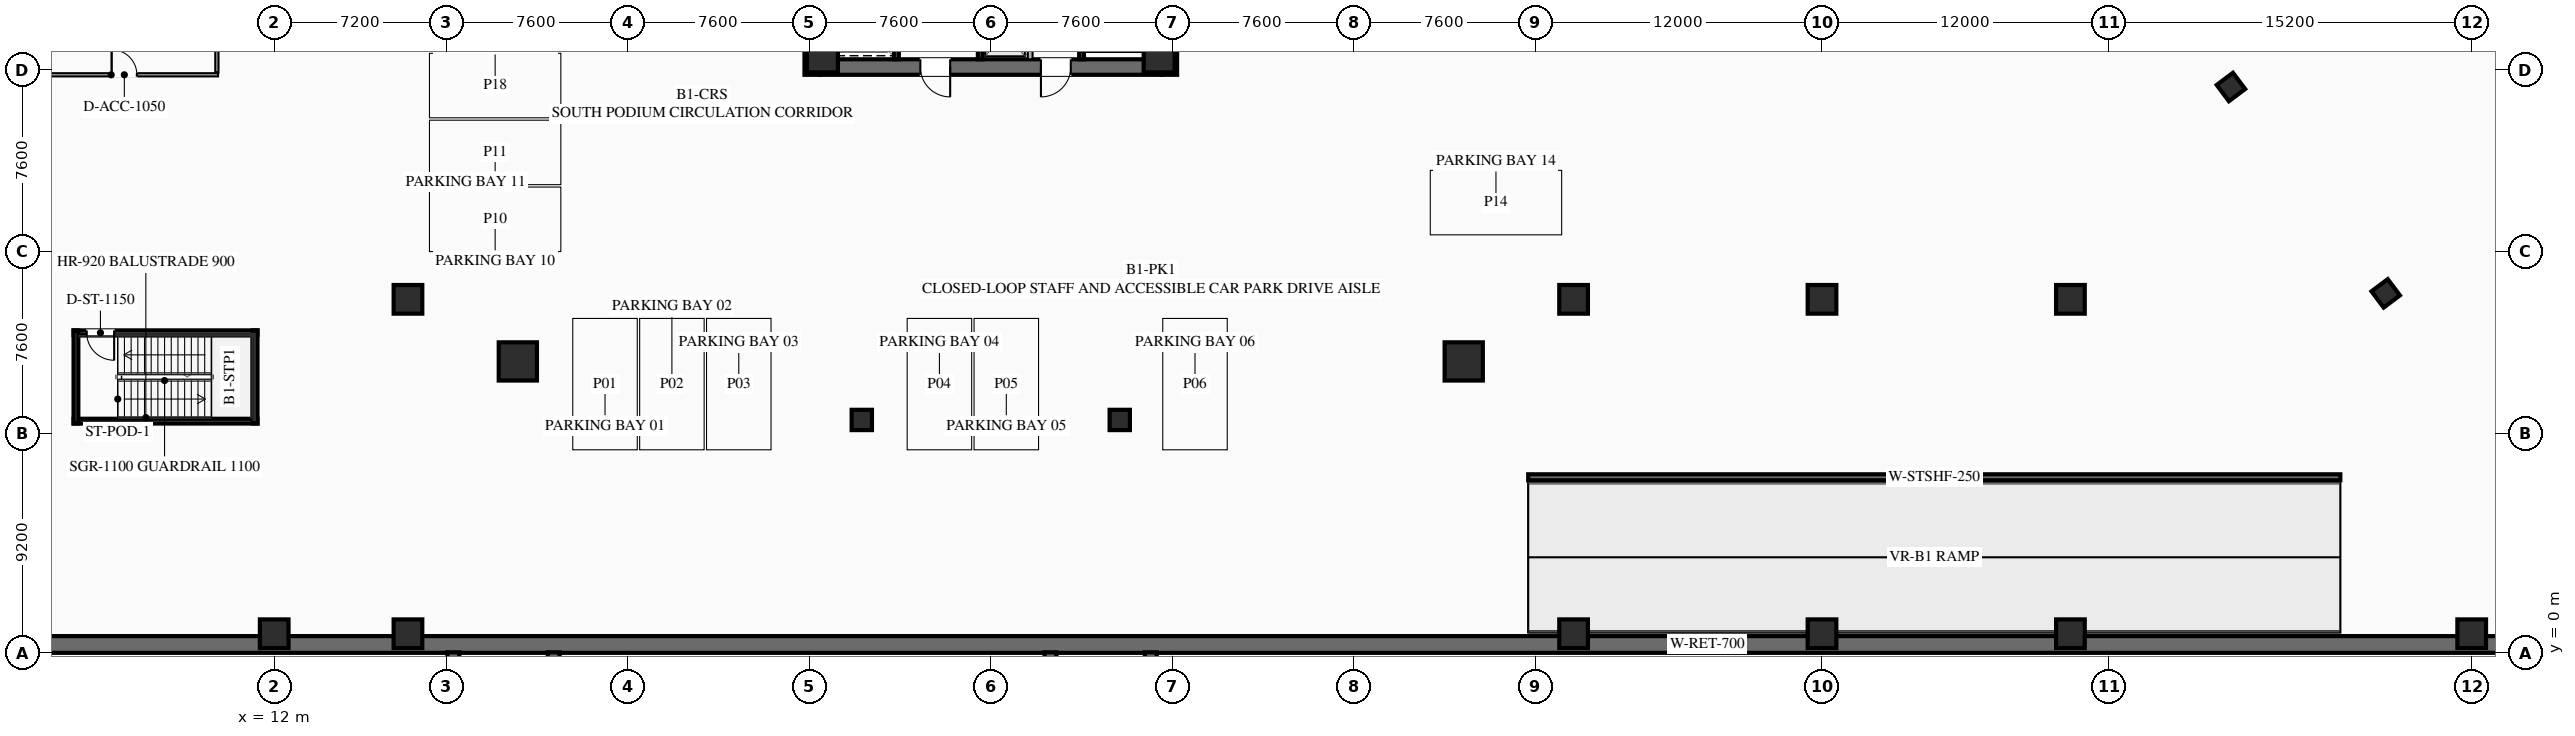
"""IFC4 building model, lengths in metres.
Left out: names, types, materials, properties, quantities, classifications, styles, units other than length and angle.
Written with IfcOpenShell. Run it as: python <this file> out.ifc"""

import sys

from ifc_helpers import new_model, si_unit, direction, frame, frame_2d, origin, origin_2d, place, context, subcontext, project, spatial, rectangle, hollow_rectangle, extrude, element, fill, save


model = new_model("IFC4")
c1 = context("Model", 3, precision=1e-05, world=origin(), true_north=direction((0.0, 1.0)))
c2 = subcontext(c1, "Body", "Model", "MODEL_VIEW")
j1 = project(units=[si_unit("LENGTHUNIT", "METRE"), si_unit("PLANEANGLEUNIT", "RADIAN")], contexts=[c1])
p1 = place(None, origin())
s1 = spatial("IfcSite", under=j1, at=p1, CompositionType="ELEMENT")
p2 = place(p1, origin())
s2 = spatial("IfcBuilding", under=s1, at=p2, CompositionType="ELEMENT")
p3 = place(p2, frame((0.0, 0.0, -5.5)))
s3 = spatial("IfcBuildingStorey", under=s2, at=p3, CompositionType="ELEMENT", Elevation=-5.5)
p4 = place(p3, frame((144.0, 0.35, 0.0), z_axis=(0.0, 0.0, 1.0), x_axis=(-1.0, 0.0, 0.0)))
e1 = element("IfcWall", 1, at=p4, inside=s3, PredefinedType="SOLIDWALL", context=c2, shape_type="SweptSolid", body=[
    extrude(rectangle(XDim=144.0, YDim=0.7, at=frame_2d((72.0, 0.0))), origin(), (0.0, 0.0, 1.0), 5.5),
])
for number, where, z_axis, x_axis in (
    (2, (34.525, 24.2, 0.0), (0.0, 0.0, 1.0), (0.0, 1.0, 0.0)),
    (3, (49.475, 39.8, 0.0), (0.0, 0.0, 1.0), (0.0, -1.0, 0.0)),
):
    element("IfcWall", number, at=place(p3, frame(where, z_axis=z_axis, x_axis=x_axis)), inside=s3, PredefinedType="SHEAR", context=c2, shape_type="SweptSolid", body=[
        extrude(rectangle(XDim=15.6, YDim=0.65, at=frame_2d((7.8, 0.0))), origin(), (0.0, 0.0, 1.0), 5.5),
    ])
p5 = place(p3, frame((49.15, 24.525, 0.0), z_axis=(0.0, 0.0, 1.0), x_axis=(-1.0, 0.0, 0.0)))
e4 = element("IfcWall", 4, at=p5, inside=s3, PredefinedType="SHEAR", context=c2, shape_type="SweptSolid", body=[
    extrude(rectangle(XDim=14.3, YDim=0.65, at=frame_2d((7.15, 0.0))), origin(), (0.0, 0.0, 1.0), 5.5),
])
p6 = place(p5, frame((8.85, 0.0, 0.0)))
e5 = element("IfcOpeningElement", 5, at=p6, cuts=e4, PredefinedType="OPENING", context=c2, shape_type="SweptSolid", body=[
    extrude(rectangle(XDim=1.25, YDim=2.25, at=frame_2d((0.625, 1.125))), frame((0.0, 0.335, 0.0), z_axis=(0.0, -1.0, 0.0), x_axis=(1.0, 0.0, 0.0)), (0.0, 0.0, 1.0), 0.67),
])
p7 = place(p5, frame((3.8, 0.0, 0.0)))
e6 = element("IfcOpeningElement", 6, at=p7, cuts=e4, PredefinedType="OPENING", context=c2, shape_type="SweptSolid", body=[
    extrude(rectangle(XDim=1.25, YDim=2.25, at=frame_2d((0.625, 1.125))), frame((0.0, 0.335, 0.0), z_axis=(0.0, -1.0, 0.0), x_axis=(1.0, 0.0, 0.0)), (0.0, 0.0, 1.0), 0.67),
])
for number, where, z_axis, x_axis in (
    (7, (34.95, 24.95, 0.0), (0.0, 0.0, 1.0), (1.0, 0.0, 0.0)),
    (8, (49.05, 24.95, 0.0), (0.0, 0.0, 1.0), (1.0, 0.0, 0.0)),
):
    element("IfcColumn", number, at=place(p3, frame(where, z_axis=z_axis, x_axis=x_axis)), inside=s3, PredefinedType="COLUMN", context=c2, shape_type="SweptSolid", body=[
        extrude(hollow_rectangle(XDim=1.3, YDim=1.3, WallThickness=0.05, at=origin_2d()), origin(), (0.0, 0.0, 1.0), 5.2),
    ])
for number, where, z_axis, x_axis in (
    (9, (22.2, 12.2, 0.0), (0.0, 0.0, 1.0), (1.0, 0.0, 0.0)),
    (10, (61.8, 12.2, 0.0), (0.0, 0.0, 1.0), (1.0, 0.0, 0.0)),
):
    element("IfcColumn", number, at=place(p3, frame(where, z_axis=z_axis, x_axis=x_axis)), inside=s3, PredefinedType="COLUMN", context=c2, shape_type="SweptSolid", body=[
        extrude(hollow_rectangle(XDim=1.6, YDim=1.6, WallThickness=0.06, at=origin_2d()), origin(), (0.0, 0.0, 1.0), 5.2),
    ])
for number, where, z_axis, x_axis in (
    (11, (36.6, 9.75, 0.0), (0.0, 0.0, 1.0), (1.0, 0.0, 0.0)),
    (12, (47.4, 9.75, 0.0), (0.0, 0.0, 1.0), (1.0, 0.0, 0.0)),
):
    element("IfcColumn", number, at=place(p3, frame(where, z_axis=z_axis, x_axis=x_axis)), inside=s3, PredefinedType="COLUMN", context=c2, shape_type="SweptSolid", body=[
        extrude(hollow_rectangle(XDim=0.85, YDim=0.85, WallThickness=0.035, at=origin_2d()), origin(), (0.0, 0.0, 1.0), 5.2),
    ])
p8 = place(p3, frame((112.476, 21.107, 0.0), z_axis=(0.0, 0.0, 1.0), x_axis=(-0.600005007985, 0.799996243986, 0.0)))
e13 = element("IfcWall", 13, at=p8, inside=s3, PredefinedType="SHEAR", context=c2, shape_type="SweptSolid", body=[
    extrude(rectangle(XDim=15.6, YDim=0.65, at=frame_2d((7.8, 0.0))), origin(), (0.0, 0.0, 1.0), 5.5),
])
for number, where, z_axis, x_axis in (
    (14, (93.92, 23.69, 0.0), (0.0, 0.0, 1.0), (0.8, 0.6, 0.0)),
    (15, (100.4, 15.05, 0.0), (0.0, 0.0, 1.0), (0.8, 0.6, 0.0)),
):
    element("IfcColumn", number, at=place(p3, frame(where, z_axis=z_axis, x_axis=x_axis)), inside=s3, PredefinedType="COLUMN", context=c2, shape_type="SweptSolid", body=[
        extrude(hollow_rectangle(XDim=0.85, YDim=0.85, WallThickness=0.035, at=origin_2d()), origin(), (0.0, 0.0, 1.0), 5.2),
    ])
for number, where, z_axis, x_axis in (
    (16, (12.0, 0.8, 0.0), (0.0, 0.0, 1.0), (1.0, 0.0, 0.0)),
    (17, (17.6, 0.8, 0.0), (0.0, 0.0, 1.0), (1.0, 0.0, 0.0)),
    (18, (66.4, 0.8, 0.0), (0.0, 0.0, 1.0), (1.0, 0.0, 0.0)),
    (19, (76.8, 0.8, 0.0), (0.0, 0.0, 1.0), (1.0, 0.0, 0.0)),
    (20, (87.2, 0.8, 0.0), (0.0, 0.0, 1.0), (1.0, 0.0, 0.0)),
    (21, (104.0, 0.8, 0.0), (0.0, 0.0, 1.0), (1.0, 0.0, 0.0)),
    (22, (17.6, 14.8, 0.0), (0.0, 0.0, 1.0), (1.0, 0.0, 0.0)),
    (23, (66.4, 14.8, 0.0), (0.0, 0.0, 1.0), (1.0, 0.0, 0.0)),
    (24, (76.8, 14.8, 0.0), (0.0, 0.0, 1.0), (1.0, 0.0, 0.0)),
    (25, (87.2, 14.8, 0.0), (0.0, 0.0, 1.0), (1.0, 0.0, 0.0)),
):
    element("IfcColumn", number, at=place(p3, frame(where, z_axis=z_axis, x_axis=x_axis)), inside=s3, PredefinedType="COLUMN", context=c2, shape_type="SweptSolid", body=[
        extrude(rectangle(XDim=1.2, YDim=1.2, at=origin_2d()), origin(), (0.0, 0.0, 1.0), 5.2),
    ])
p9 = place(p3, frame((19.5, -2.35, -6.0), z_axis=(0.0, 0.0, 1.0), x_axis=(0.0, 1.0, 0.0)))
e26 = element("IfcWall", 26, at=p9, inside=s3, PredefinedType="SOLIDWALL", context=c2, shape_type="SweptSolid", body=[
    extrude(rectangle(XDim=2.37, YDim=0.5, at=frame_2d((1.185, 0.0))), origin(), (0.0, 0.0, 1.0), 11.15),
])
p10 = place(p3, frame((23.7, -2.35, -6.0), z_axis=(0.0, 0.0, 1.0), x_axis=(0.0, 1.0, 0.0)))
e27 = element("IfcWall", 27, at=p10, inside=s3, PredefinedType="SOLIDWALL", context=c2, shape_type="SweptSolid", body=[
    extrude(rectangle(XDim=2.37, YDim=0.5, at=frame_2d((1.185, 0.0))), origin(), (0.0, 0.0, 1.0), 11.48),
])
p11 = place(p3, frame((44.5, -2.35, -6.0), z_axis=(0.0, 0.0, 1.0), x_axis=(0.0, 1.0, 0.0)))
e28 = element("IfcWall", 28, at=p11, inside=s3, PredefinedType="SOLIDWALL", context=c2, shape_type="SweptSolid", body=[
    extrude(rectangle(XDim=2.37, YDim=0.5, at=frame_2d((1.185, 0.0))), origin(), (0.0, 0.0, 1.0), 11.15),
])
p12 = place(p3, frame((48.7, -2.35, -6.0), z_axis=(0.0, 0.0, 1.0), x_axis=(0.0, 1.0, 0.0)))
e29 = element("IfcWall", 29, at=p12, inside=s3, PredefinedType="SOLIDWALL", context=c2, shape_type="SweptSolid", body=[
    extrude(rectangle(XDim=2.37, YDim=0.5, at=frame_2d((1.185, 0.0))), origin(), (0.0, 0.0, 1.0), 11.48),
])
p13 = place(p3, frame((45.8, 32.8, 0.0), z_axis=(0.0, 0.0, 1.0), x_axis=(0.0, -1.0, 0.0)))
e30 = element("IfcWall", 30, at=p13, inside=s3, PredefinedType="SHEAR", context=c2, shape_type="SweptSolid", body=[
    extrude(rectangle(XDim=7.95, YDim=0.2, at=frame_2d((3.975, 0.0))), origin(), (0.0, 0.0, 1.0), 5.2),
])
p14 = place(p13, frame((0.45, 0.0, 0.0)))
e31 = element("IfcOpeningElement", 31, at=p14, cuts=e30, PredefinedType="OPENING", context=c2, shape_type="SweptSolid", body=[
    extrude(rectangle(XDim=1.15, YDim=2.2, at=frame_2d((0.575, 1.1))), frame((0.0, 0.11, 0.0), z_axis=(0.0, -1.0, 0.0), x_axis=(1.0, 0.0, 0.0)), (0.0, 0.0, 1.0), 0.22),
])
p15 = place(p3, frame((41.56, 24.85, 0.0), z_axis=(0.0, 0.0, 1.0), x_axis=(0.0, 1.0, 0.0)))
e32 = element("IfcWall", 32, at=p15, inside=s3, PredefinedType="SHEAR", context=c2, shape_type="SweptSolid", body=[
    extrude(rectangle(XDim=14.3, YDim=0.2, at=frame_2d((7.15, 0.0))), origin(), (0.0, 0.0, 1.0), 5.2),
])
p16 = place(p3, frame((38.05, 24.85, 0.0), z_axis=(0.0, 0.0, 1.0), x_axis=(0.0, 1.0, 0.0)))
e33 = element("IfcWall", 33, at=p16, inside=s3, PredefinedType="SHEAR", context=c2, shape_type="SweptSolid", body=[
    extrude(rectangle(XDim=6.35, YDim=0.2, at=frame_2d((3.175, 0.0))), origin(), (0.0, 0.0, 1.0), 5.2),
])
p17 = place(p16, frame((4.775, 0.0, 0.0)))
e34 = element("IfcOpeningElement", 34, at=p17, cuts=e33, PredefinedType="OPENING", context=c2, shape_type="SweptSolid", body=[
    extrude(rectangle(XDim=1.3, YDim=2.25, at=frame_2d((0.65, 1.125))), frame((0.0, 0.11, 0.0), z_axis=(0.0, -1.0, 0.0), x_axis=(1.0, 0.0, 0.0)), (0.0, 0.0, 1.0), 0.22),
])
p18 = place(p16, frame((2.775, 0.0, 0.0)))
e35 = element("IfcOpeningElement", 35, at=p18, cuts=e33, PredefinedType="OPENING", context=c2, shape_type="SweptSolid", body=[
    extrude(rectangle(XDim=1.3, YDim=2.25, at=frame_2d((0.65, 1.125))), frame((0.0, 0.11, 0.0), z_axis=(0.0, -1.0, 0.0), x_axis=(1.0, 0.0, 0.0)), (0.0, 0.0, 1.0), 0.22),
])
p19 = place(p16, frame((0.575, 0.0, 0.0)))
e36 = element("IfcOpeningElement", 36, at=p19, cuts=e33, PredefinedType="OPENING", context=c2, shape_type="SweptSolid", body=[
    extrude(rectangle(XDim=1.3, YDim=2.25, at=frame_2d((0.65, 1.125))), frame((0.0, 0.11, 0.0), z_axis=(0.0, -1.0, 0.0), x_axis=(1.0, 0.0, 0.0)), (0.0, 0.0, 1.0), 0.22),
])
p20 = place(p3, frame((43.65, 24.85, 0.0), z_axis=(0.0, 0.0, 1.0), x_axis=(0.0, 1.0, 0.0)))
e37 = element("IfcWall", 37, at=p20, inside=s3, PredefinedType="SOLIDWALL", context=c2, shape_type="SweptSolid", body=[
    extrude(rectangle(XDim=6.8, YDim=0.2, at=frame_2d((3.4, 0.0))), origin(), (0.0, 0.0, 1.0), 5.2),
])
p21 = place(p20, frame((0.625, 0.0, 0.0)))
e38 = element("IfcOpeningElement", 38, at=p21, cuts=e37, PredefinedType="OPENING", context=c2, shape_type="SweptSolid", body=[
    extrude(rectangle(XDim=1.1, YDim=2.2, at=frame_2d((0.55, 1.1))), frame((0.0, 0.11, 0.0), z_axis=(0.0, -1.0, 0.0), x_axis=(1.0, 0.0, 0.0)), (0.0, 0.0, 1.0), 0.22),
])
p22 = place(p20, frame((2.875, 0.0, 0.0)))
e39 = element("IfcOpeningElement", 39, at=p22, cuts=e37, PredefinedType="OPENING", context=c2, shape_type="SweptSolid", body=[
    extrude(rectangle(XDim=1.1, YDim=2.2, at=frame_2d((0.55, 1.1))), frame((0.0, 0.11, 0.0), z_axis=(0.0, -1.0, 0.0), x_axis=(1.0, 0.0, 0.0)), (0.0, 0.0, 1.0), 0.22),
])
p23 = place(p20, frame((5.125, 0.0, 0.0)))
e40 = element("IfcOpeningElement", 40, at=p23, cuts=e37, PredefinedType="OPENING", context=c2, shape_type="SweptSolid", body=[
    extrude(rectangle(XDim=1.1, YDim=2.2, at=frame_2d((0.55, 1.1))), frame((0.0, 0.11, 0.0), z_axis=(0.0, -1.0, 0.0), x_axis=(1.0, 0.0, 0.0)), (0.0, 0.0, 1.0), 0.22),
])
p24 = place(p3, frame((11.3, 13.4, 0.0), z_axis=(0.0, 0.0, 1.0), x_axis=(-1.0, 0.0, 0.0)))
e41 = element("IfcWall", 41, at=p24, inside=s3, PredefinedType="SHEAR", context=c2, shape_type="SweptSolid", body=[
    extrude(rectangle(XDim=7.7, YDim=0.2, at=frame_2d((3.85, 0.0))), origin(), (0.0, 0.0, 1.0), 5.2),
])
p25 = place(p24, frame((6.0, 0.0, 0.0)))
e42 = element("IfcOpeningElement", 42, at=p25, cuts=e41, PredefinedType="OPENING", context=c2, shape_type="SweptSolid", body=[
    extrude(rectangle(XDim=1.15, YDim=2.2, at=frame_2d((0.575, 1.1))), frame((0.0, 0.11, 0.0), z_axis=(0.0, -1.0, 0.0), x_axis=(1.0, 0.0, 0.0)), (0.0, 0.0, 1.0), 0.22),
])
p26 = place(p3, frame((3.6, 9.7, 0.0), z_axis=(0.0, 0.0, 1.0), x_axis=(1.0, 0.0, 0.0)))
e43 = element("IfcWall", 43, at=p26, inside=s3, PredefinedType="SHEAR", context=c2, shape_type="SweptSolid", body=[
    extrude(rectangle(XDim=7.7, YDim=0.2, at=frame_2d((3.85, 0.0))), origin(), (0.0, 0.0, 1.0), 5.2),
])
for number, where, z_axis, x_axis in (
    (44, (3.7, 9.6, 0.0), (0.0, 0.0, 1.0), (0.0, 1.0, 0.0)),
    (45, (11.2, 9.6, 0.0), (0.0, 0.0, 1.0), (0.0, 1.0, 0.0)),
):
    element("IfcWall", number, at=place(p3, frame(where, z_axis=z_axis, x_axis=x_axis)), inside=s3, PredefinedType="SHEAR", context=c2, shape_type="SweptSolid", body=[
        extrude(rectangle(XDim=3.9, YDim=0.2, at=frame_2d((1.95, 0.0))), origin(), (0.0, 0.0, 1.0), 5.2),
    ])
p27 = place(p3, frame((0.7, 24.2, 0.0), z_axis=(0.0, 0.0, 1.0), x_axis=(1.0, 0.0, 0.0)))
e46 = element("IfcWall", 46, at=p27, inside=s3, PredefinedType="PARTITIONING", context=c2, shape_type="SweptSolid", body=[
    extrude(rectangle(XDim=8.95, YDim=0.135, at=frame_2d((4.475, 0.0))), origin(), (0.0, 0.0, 1.0), 4.243),
])
p28 = place(p27, frame((4.5, 0.0, 0.0)))
e47 = element("IfcOpeningElement", 47, at=p28, cuts=e46, PredefinedType="OPENING", context=c2, shape_type="SweptSolid", body=[
    extrude(rectangle(XDim=1.05, YDim=2.2, at=frame_2d((0.525, 1.1))), frame((0.0, 0.077, 0.0), z_axis=(0.0, -1.0, 0.0), x_axis=(1.0, 0.0, 0.0)), (0.0, 0.0, 1.0), 0.155),
])
p29 = place(p3, frame((9.6, 24.3, 0.0), z_axis=(0.0, 0.0, 1.0), x_axis=(0.0, 1.0, 0.0)))
e48 = element("IfcWall", 48, at=p29, inside=s3, PredefinedType="PARTITIONING", context=c2, shape_type="SweptSolid", body=[
    extrude(rectangle(XDim=15.5, YDim=0.135, at=frame_2d((7.75, 0.0))), origin(), (0.0, 0.0, 1.0), 4.243),
])
p30 = place(p3, frame((64.5, 7.35, 0.0), z_axis=(0.0, 0.0, 1.0), x_axis=(1.0, 0.0, 0.0)))
e49 = element("IfcWall", 49, at=p30, inside=s3, PredefinedType="SHEAR", context=c2, shape_type="SweptSolid", body=[
    extrude(rectangle(XDim=34.0, YDim=0.25, at=frame_2d((17.0, 0.0))), origin(), (0.0, 0.0, 1.0), 5.2),
])
p31 = place(p6, origin())
e50 = element("IfcDoor", 50, at=p31, inside=s3, OperationType="SINGLE_SWING_LEFT", PredefinedType="DOOR", context=c2, shape_type="SweptSolid", body=[
    extrude(rectangle(XDim=1.25, YDim=2.25, at=frame_2d((0.625, 1.125))), frame((0.0, 0.025, 0.0), z_axis=(0.0, -1.0, 0.0), x_axis=(1.0, 0.0, 0.0)), (0.0, 0.0, 1.0), 0.05),
])
fill(e5, e50)
p32 = place(p7, origin())
e51 = element("IfcDoor", 51, at=p32, inside=s3, OperationType="SINGLE_SWING_RIGHT", PredefinedType="DOOR", context=c2, shape_type="SweptSolid", body=[
    extrude(rectangle(XDim=1.25, YDim=2.25, at=frame_2d((0.625, 1.125))), frame((0.0, 0.025, 0.0), z_axis=(0.0, -1.0, 0.0), x_axis=(1.0, 0.0, 0.0)), (0.0, 0.0, 1.0), 0.05),
])
fill(e6, e51)
p33 = place(p25, origin())
e52 = element("IfcDoor", 52, at=p33, inside=s3, OperationType="SINGLE_SWING_LEFT", PredefinedType="DOOR", context=c2, shape_type="SweptSolid", body=[
    extrude(rectangle(XDim=1.15, YDim=2.2, at=frame_2d((0.575, 1.1))), frame((0.0, 0.025, 0.0), z_axis=(0.0, -1.0, 0.0), x_axis=(1.0, 0.0, 0.0)), (0.0, 0.0, 1.0), 0.05),
])
fill(e42, e52)
p34 = place(p28, origin())
e53 = element("IfcDoor", 53, at=p34, inside=s3, OperationType="SINGLE_SWING_LEFT", PredefinedType="DOOR", context=c2, shape_type="SweptSolid", body=[
    extrude(rectangle(XDim=1.05, YDim=2.2, at=frame_2d((0.525, 1.1))), frame((0.0, 0.025, 0.0), z_axis=(0.0, -1.0, 0.0), x_axis=(1.0, 0.0, 0.0)), (0.0, 0.0, 1.0), 0.05),
])
fill(e47, e53)
save(model, sys.argv[1])
